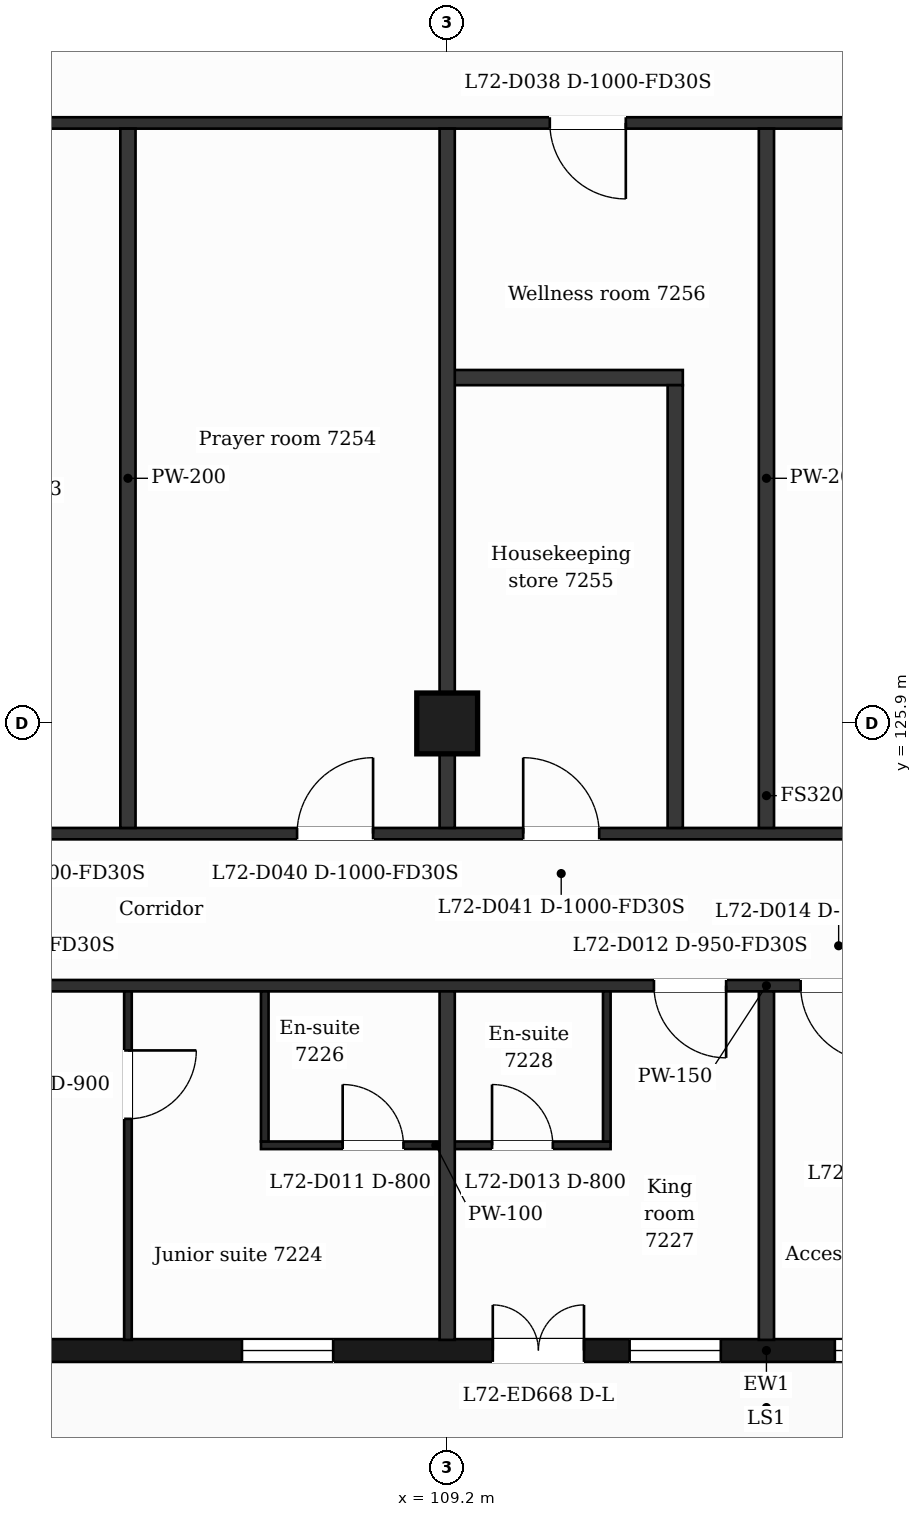
"""IFC4 building model, lengths in metres.
Left out: names, types, materials, properties, quantities, classifications, styles, units other than length and angle.
Written with IfcOpenShell. Run it as: python <this file> out.ifc"""

import sys

from ifc_helpers import new_model, si_unit, direction, frame, frame_2d, origin, origin_2d, place, context, subcontext, project, spatial, rectangle, extrude, element, fill, save


model = new_model("IFC4")
c1 = context("Model", 3, precision=1e-05, world=origin(), true_north=direction((0.0, 1.0)))
c2 = subcontext(c1, "Body", "Model", "MODEL_VIEW")
j1 = project(units=[si_unit("LENGTHUNIT", "METRE"), si_unit("PLANEANGLEUNIT", "RADIAN")], contexts=[c1])
p1 = place(None, origin())
s1 = spatial("IfcSite", under=j1, at=p1, CompositionType="ELEMENT")
p2 = place(p1, origin())
s2 = spatial("IfcBuilding", under=s1, at=p2, CompositionType="ELEMENT")
p3 = place(p2, frame((0.0, 0.0, 296.0)))
s3 = spatial("IfcBuildingStorey", under=s2, at=p3, CompositionType="ELEMENT", Elevation=296.0)
p4 = place(p3, frame((109.2, 125.9, 0.0), z_axis=(0.0, 0.0, 1.0), x_axis=(1.0, 0.0, 0.0)))
e1 = element("IfcColumn", 1, at=p4, inside=s3, PredefinedType="COLUMN", context=c2, shape_type="SweptSolid", body=[
    extrude(rectangle(XDim=0.8, YDim=0.8, at=origin_2d()), origin(), (0.0, 0.0, 1.0), 3.7),
])
p5 = place(p3, frame((100.8, 117.65, 0.0), z_axis=(0.0, 0.0, 1.0), x_axis=(1.0, 0.0, 0.0)))
e2 = element("IfcWall", 2, at=p5, inside=s3, PredefinedType="SOLIDWALL", context=c2, shape_type="SweptSolid", body=[
    extrude(rectangle(XDim=25.2, YDim=0.3, at=frame_2d((12.6, 0.0))), origin(), (0.0, 0.0, 1.0), 3.38),
])
p6 = place(p5, frame((1.55, 0.0, 0.9)))
e3 = element("IfcOpeningElement", 3, at=p6, cuts=e2, PredefinedType="OPENING", context=c2, shape_type="SweptSolid", body=[
    extrude(rectangle(XDim=1.2, YDim=2.1, at=frame_2d((0.6, 1.05))), frame((0.0, 0.16, 0.0), z_axis=(0.0, -1.0, 0.0), x_axis=(1.0, 0.0, 0.0)), (0.0, 0.0, 1.0), 0.32),
])
p7 = place(p5, frame((5.7, 0.0, 0.9)))
e4 = element("IfcOpeningElement", 4, at=p7, cuts=e2, PredefinedType="OPENING", context=c2, shape_type="SweptSolid", body=[
    extrude(rectangle(XDim=1.2, YDim=2.1, at=frame_2d((0.6, 1.05))), frame((0.0, 0.16, 0.0), z_axis=(0.0, -1.0, 0.0), x_axis=(1.0, 0.0, 0.0)), (0.0, 0.0, 1.0), 0.32),
])
p8 = place(p5, frame((9.0, 0.0, 0.0)))
e5 = element("IfcOpeningElement", 5, at=p8, cuts=e2, PredefinedType="OPENING", context=c2, shape_type="SweptSolid", body=[
    extrude(rectangle(XDim=1.2, YDim=2.4, at=frame_2d((0.6, 1.2))), frame((0.0, 0.16, 0.0), z_axis=(0.0, -1.0, 0.0), x_axis=(1.0, 0.0, 0.0)), (0.0, 0.0, 1.0), 0.32),
])
p9 = place(p5, frame((10.8, 0.0, 0.9)))
e6 = element("IfcOpeningElement", 6, at=p9, cuts=e2, PredefinedType="OPENING", context=c2, shape_type="SweptSolid", body=[
    extrude(rectangle(XDim=1.2, YDim=2.1, at=frame_2d((0.6, 1.05))), frame((0.0, 0.16, 0.0), z_axis=(0.0, -1.0, 0.0), x_axis=(1.0, 0.0, 0.0)), (0.0, 0.0, 1.0), 0.32),
])
p10 = place(p5, frame((13.5, 0.0, 0.9)))
e7 = element("IfcOpeningElement", 7, at=p10, cuts=e2, PredefinedType="OPENING", context=c2, shape_type="SweptSolid", body=[
    extrude(rectangle(XDim=2.4, YDim=2.1, at=frame_2d((1.2, 1.05))), frame((0.0, 0.16, 0.0), z_axis=(0.0, -1.0, 0.0), x_axis=(1.0, 0.0, 0.0)), (0.0, 0.0, 1.0), 0.32),
])
p11 = place(p5, frame((17.4, 0.0, 0.0)))
e8 = element("IfcOpeningElement", 8, at=p11, cuts=e2, PredefinedType="OPENING", context=c2, shape_type="SweptSolid", body=[
    extrude(rectangle(XDim=1.2, YDim=2.4, at=frame_2d((0.6, 1.2))), frame((0.0, 0.16, 0.0), z_axis=(0.0, -1.0, 0.0), x_axis=(1.0, 0.0, 0.0)), (0.0, 0.0, 1.0), 0.32),
])
p12 = place(p5, frame((19.2, 0.0, 0.9)))
e9 = element("IfcOpeningElement", 9, at=p12, cuts=e2, PredefinedType="OPENING", context=c2, shape_type="SweptSolid", body=[
    extrude(rectangle(XDim=1.2, YDim=2.1, at=frame_2d((0.6, 1.05))), frame((0.0, 0.16, 0.0), z_axis=(0.0, -1.0, 0.0), x_axis=(1.0, 0.0, 0.0)), (0.0, 0.0, 1.0), 0.32),
])
p13 = place(p5, frame((21.85, 0.0, 0.9)))
e10 = element("IfcOpeningElement", 10, at=p13, cuts=e2, PredefinedType="OPENING", context=c2, shape_type="SweptSolid", body=[
    extrude(rectangle(XDim=2.4, YDim=2.1, at=frame_2d((1.2, 1.05))), frame((0.0, 0.16, 0.0), z_axis=(0.0, -1.0, 0.0), x_axis=(1.0, 0.0, 0.0)), (0.0, 0.0, 1.0), 0.32),
])
p14 = place(p3, frame((106.75, 120.35, 0.0), z_axis=(0.0, 0.0, 1.0), x_axis=(1.0, 0.0, 0.0)))
e11 = element("IfcWall", 11, at=p14, inside=s3, PredefinedType="PARTITIONING", context=c2, shape_type="SweptSolid", body=[
    extrude(rectangle(XDim=4.6, YDim=0.1, at=frame_2d((2.3, 0.0))), origin(), (0.0, 0.0, 1.0), 3.38),
])
p15 = place(p14, frame((1.075, 0.0, 0.0)))
e12 = element("IfcOpeningElement", 12, at=p15, cuts=e11, PredefinedType="OPENING", context=c2, shape_type="SweptSolid", body=[
    extrude(rectangle(XDim=0.8, YDim=2.1, at=frame_2d((0.4, 1.05))), frame((0.0, 0.06, 0.0), z_axis=(0.0, -1.0, 0.0), x_axis=(1.0, 0.0, 0.0)), (0.0, 0.0, 1.0), 0.12),
])
p16 = place(p14, frame((3.04, 0.0, 0.0)))
e13 = element("IfcOpeningElement", 13, at=p16, cuts=e11, PredefinedType="OPENING", context=c2, shape_type="SweptSolid", body=[
    extrude(rectangle(XDim=0.8, YDim=2.1, at=frame_2d((0.4, 1.05))), frame((0.0, 0.06, 0.0), z_axis=(0.0, -1.0, 0.0), x_axis=(1.0, 0.0, 0.0)), (0.0, 0.0, 1.0), 0.12),
])
p17 = place(p3, frame((100.8, 122.45, 0.0), z_axis=(0.0, 0.0, 1.0), x_axis=(1.0, 0.0, 0.0)))
e14 = element("IfcWall", 14, at=p17, inside=s3, PredefinedType="PARTITIONING", context=c2, shape_type="SweptSolid", body=[
    extrude(rectangle(XDim=25.2, YDim=0.15, at=frame_2d((12.6, 0.0))), origin(), (0.0, 0.0, 1.0), 3.38),
])
p18 = place(p17, frame((1.6, 0.0, 0.0)))
e15 = element("IfcOpeningElement", 15, at=p18, cuts=e14, PredefinedType="OPENING", context=c2, shape_type="SweptSolid", body=[
    extrude(rectangle(XDim=1.0, YDim=2.1, at=frame_2d((0.5, 1.05))), frame((0.0, 0.085, 0.0), z_axis=(0.0, -1.0, 0.0), x_axis=(1.0, 0.0, 0.0)), (0.0, 0.0, 1.0), 0.17),
])
p19 = place(p17, frame((11.12, 0.0, 0.0)))
e16 = element("IfcOpeningElement", 16, at=p19, cuts=e14, PredefinedType="OPENING", context=c2, shape_type="SweptSolid", body=[
    extrude(rectangle(XDim=0.95, YDim=2.1, at=frame_2d((0.475, 1.05))), frame((0.0, 0.085, 0.0), z_axis=(0.0, -1.0, 0.0), x_axis=(1.0, 0.0, 0.0)), (0.0, 0.0, 1.0), 0.17),
])
p20 = place(p17, frame((13.05, 0.0, 0.0)))
e17 = element("IfcOpeningElement", 17, at=p20, cuts=e14, PredefinedType="OPENING", context=c2, shape_type="SweptSolid", body=[
    extrude(rectangle(XDim=1.0, YDim=2.1, at=frame_2d((0.5, 1.05))), frame((0.0, 0.085, 0.0), z_axis=(0.0, -1.0, 0.0), x_axis=(1.0, 0.0, 0.0)), (0.0, 0.0, 1.0), 0.17),
])
p21 = place(p17, frame((19.61, 0.0, 0.0)))
e18 = element("IfcOpeningElement", 18, at=p21, cuts=e14, PredefinedType="OPENING", context=c2, shape_type="SweptSolid", body=[
    extrude(rectangle(XDim=0.95, YDim=2.1, at=frame_2d((0.475, 1.05))), frame((0.0, 0.085, 0.0), z_axis=(0.0, -1.0, 0.0), x_axis=(1.0, 0.0, 0.0)), (0.0, 0.0, 1.0), 0.17),
])
p22 = place(p17, frame((21.275, 0.0, 0.0)))
e19 = element("IfcOpeningElement", 19, at=p22, cuts=e14, PredefinedType="OPENING", context=c2, shape_type="SweptSolid", body=[
    extrude(rectangle(XDim=0.95, YDim=2.1, at=frame_2d((0.475, 1.05))), frame((0.0, 0.085, 0.0), z_axis=(0.0, -1.0, 0.0), x_axis=(1.0, 0.0, 0.0)), (0.0, 0.0, 1.0), 0.17),
])
p23 = place(p3, frame((100.8, 124.45, 0.0), z_axis=(0.0, 0.0, 1.0), x_axis=(1.0, 0.0, 0.0)))
e20 = element("IfcWall", 20, at=p23, inside=s3, PredefinedType="PARTITIONING", context=c2, shape_type="SweptSolid", body=[
    extrude(rectangle(XDim=25.2, YDim=0.15, at=frame_2d((12.6, 0.0))), origin(), (0.0, 0.0, 1.0), 3.38),
])
p24 = place(p23, frame((1.85, 0.0, 0.0)))
e21 = element("IfcOpeningElement", 21, at=p24, cuts=e20, PredefinedType="OPENING", context=c2, shape_type="SweptSolid", body=[
    extrude(rectangle(XDim=1.0, YDim=2.1, at=frame_2d((0.5, 1.05))), frame((0.0, 0.085, 0.0), z_axis=(0.0, -1.0, 0.0), x_axis=(1.0, 0.0, 0.0)), (0.0, 0.0, 1.0), 0.17),
])
p25 = place(p23, frame((6.425, 0.0, 0.0)))
e22 = element("IfcOpeningElement", 22, at=p25, cuts=e20, PredefinedType="OPENING", context=c2, shape_type="SweptSolid", body=[
    extrude(rectangle(XDim=1.0, YDim=2.1, at=frame_2d((0.5, 1.05))), frame((0.0, 0.085, 0.0), z_axis=(0.0, -1.0, 0.0), x_axis=(1.0, 0.0, 0.0)), (0.0, 0.0, 1.0), 0.17),
])
p26 = place(p23, frame((9.4, 0.0, 0.0)))
e23 = element("IfcOpeningElement", 23, at=p26, cuts=e20, PredefinedType="OPENING", context=c2, shape_type="SweptSolid", body=[
    extrude(rectangle(XDim=1.0, YDim=2.1, at=frame_2d((0.5, 1.05))), frame((0.0, 0.085, 0.0), z_axis=(0.0, -1.0, 0.0), x_axis=(1.0, 0.0, 0.0)), (0.0, 0.0, 1.0), 0.17),
])
p27 = place(p23, frame((14.825, 0.0, 0.0)))
e24 = element("IfcOpeningElement", 24, at=p27, cuts=e20, PredefinedType="OPENING", context=c2, shape_type="SweptSolid", body=[
    extrude(rectangle(XDim=1.0, YDim=2.1, at=frame_2d((0.5, 1.05))), frame((0.0, 0.085, 0.0), z_axis=(0.0, -1.0, 0.0), x_axis=(1.0, 0.0, 0.0)), (0.0, 0.0, 1.0), 0.17),
])
p28 = place(p23, frame((18.825, 0.0, 0.0)))
e25 = element("IfcOpeningElement", 25, at=p28, cuts=e20, PredefinedType="OPENING", context=c2, shape_type="SweptSolid", body=[
    extrude(rectangle(XDim=1.0, YDim=2.1, at=frame_2d((0.5, 1.05))), frame((0.0, 0.085, 0.0), z_axis=(0.0, -1.0, 0.0), x_axis=(1.0, 0.0, 0.0)), (0.0, 0.0, 1.0), 0.17),
])
p29 = place(p3, frame((109.2, 130.45, 0.0), z_axis=(0.0, 0.0, 1.0), x_axis=(1.0, 0.0, 0.0)))
e26 = element("IfcWall", 26, at=p29, inside=s3, PredefinedType="PARTITIONING", context=c2, shape_type="SweptSolid", body=[
    extrude(rectangle(XDim=3.1, YDim=0.2, at=frame_2d((1.55, 0.0))), origin(), (0.0, 0.0, 1.0), 3.38),
])
p30 = place(p3, frame((100.725, 133.8, 0.0), z_axis=(0.0, 0.0, 1.0), x_axis=(1.0, 0.0, 0.0)))
e27 = element("IfcWall", 27, at=p30, inside=s3, PredefinedType="PARTITIONING", context=c2, shape_type="SweptSolid", body=[
    extrude(rectangle(XDim=25.35, YDim=0.15, at=frame_2d((12.675, 0.0))), origin(), (0.0, 0.0, 1.0), 3.38),
])
p31 = place(p30, frame((9.825, 0.0, 0.0)))
e28 = element("IfcOpeningElement", 28, at=p31, cuts=e27, PredefinedType="OPENING", context=c2, shape_type="SweptSolid", body=[
    extrude(rectangle(XDim=1.0, YDim=2.1, at=frame_2d((0.5, 1.05))), frame((0.0, 0.085, 0.0), z_axis=(0.0, -1.0, 0.0), x_axis=(1.0, 0.0, 0.0)), (0.0, 0.0, 1.0), 0.17),
])
p32 = place(p3, frame((105.0, 117.79, 0.0), z_axis=(0.0, 0.0, 1.0), x_axis=(0.0, 1.0, 0.0)))
e29 = element("IfcWall", 29, at=p32, inside=s3, PredefinedType="PARTITIONING", context=c2, shape_type="SweptSolid", body=[
    extrude(rectangle(XDim=4.585, YDim=0.1, at=frame_2d((2.292, 0.0))), origin(), (0.0, 0.0, 1.0), 3.38),
])
p33 = place(p32, frame((2.908, 0.0, 0.0)))
e30 = element("IfcOpeningElement", 30, at=p33, cuts=e29, PredefinedType="OPENING", context=c2, shape_type="SweptSolid", body=[
    extrude(rectangle(XDim=0.9, YDim=2.1, at=frame_2d((0.45, 1.05))), frame((0.0, 0.06, 0.0), z_axis=(0.0, -1.0, 0.0), x_axis=(1.0, 0.0, 0.0)), (0.0, 0.0, 1.0), 0.12),
])
p34 = place(p3, frame((105.0, 124.525, 0.0), z_axis=(0.0, 0.0, 1.0), x_axis=(0.0, 1.0, 0.0)))
e31 = element("IfcWall", 31, at=p34, inside=s3, PredefinedType="PARTITIONING", context=c2, shape_type="SweptSolid", body=[
    extrude(rectangle(XDim=9.2, YDim=0.2, at=frame_2d((4.6, 0.0))), origin(), (0.0, 0.0, 1.0), 3.38),
])
p35 = place(p3, frame((106.8, 120.4, 0.0), z_axis=(0.0, 0.0, 1.0), x_axis=(0.0, 1.0, 0.0)))
e32 = element("IfcWall", 32, at=p35, inside=s3, PredefinedType="PARTITIONING", context=c2, shape_type="SweptSolid", body=[
    extrude(rectangle(XDim=1.975, YDim=0.1, at=frame_2d((0.988, 0.0))), origin(), (0.0, 0.0, 1.0), 3.38),
])
p36 = place(p3, frame((109.2, 117.79, 0.0), z_axis=(0.0, 0.0, 1.0), x_axis=(0.0, 1.0, 0.0)))
e33 = element("IfcWall", 33, at=p36, inside=s3, PredefinedType="PARTITIONING", context=c2, shape_type="SweptSolid", body=[
    extrude(rectangle(XDim=4.585, YDim=0.2, at=frame_2d((2.292, 0.0))), origin(), (0.0, 0.0, 1.0), 3.38),
])
p37 = place(p3, frame((109.2, 124.525, 0.0), z_axis=(0.0, 0.0, 1.0), x_axis=(0.0, 1.0, 0.0)))
e34 = element("IfcWall", 34, at=p37, inside=s3, PredefinedType="PARTITIONING", context=c2, shape_type="SweptSolid", body=[
    extrude(rectangle(XDim=9.2, YDim=0.2, at=frame_2d((4.6, 0.0))), origin(), (0.0, 0.0, 1.0), 3.38),
])
p38 = place(p3, frame((111.3, 120.4, 0.0), z_axis=(0.0, 0.0, 1.0), x_axis=(0.0, 1.0, 0.0)))
e35 = element("IfcWall", 35, at=p38, inside=s3, PredefinedType="PARTITIONING", context=c2, shape_type="SweptSolid", body=[
    extrude(rectangle(XDim=1.975, YDim=0.1, at=frame_2d((0.988, 0.0))), origin(), (0.0, 0.0, 1.0), 3.38),
])
p39 = place(p3, frame((112.2, 124.525, 0.0), z_axis=(0.0, 0.0, 1.0), x_axis=(0.0, 1.0, 0.0)))
e36 = element("IfcWall", 36, at=p39, inside=s3, PredefinedType="PARTITIONING", context=c2, shape_type="SweptSolid", body=[
    extrude(rectangle(XDim=5.825, YDim=0.2, at=frame_2d((2.913, 0.0))), origin(), (0.0, 0.0, 1.0), 3.38),
])
p40 = place(p3, frame((113.4, 117.79, 0.0), z_axis=(0.0, 0.0, 1.0), x_axis=(0.0, 1.0, 0.0)))
e37 = element("IfcWall", 37, at=p40, inside=s3, PredefinedType="PARTITIONING", context=c2, shape_type="SweptSolid", body=[
    extrude(rectangle(XDim=4.585, YDim=0.2, at=frame_2d((2.292, 0.0))), origin(), (0.0, 0.0, 1.0), 3.38),
])
p41 = place(p3, frame((113.4, 124.525, 0.0), z_axis=(0.0, 0.0, 1.0), x_axis=(0.0, 1.0, 0.0)))
e38 = element("IfcWall", 38, at=p41, inside=s3, PredefinedType="PARTITIONING", context=c2, shape_type="SweptSolid", body=[
    extrude(rectangle(XDim=9.2, YDim=0.2, at=frame_2d((4.6, 0.0))), origin(), (0.0, 0.0, 1.0), 3.38),
])
p42 = place(p7, origin())
e39 = element("IfcWindow", 39, at=p42, inside=s3, PartitioningType="SINGLE_PANEL", PredefinedType="WINDOW", context=c2, shape_type="SweptSolid", body=[
    extrude(rectangle(XDim=1.2, YDim=2.1, at=frame_2d((0.6, 1.05))), frame((0.0, 0.03, 0.0), z_axis=(0.0, -1.0, 0.0), x_axis=(1.0, 0.0, 0.0)), (0.0, 0.0, 1.0), 0.06),
])
fill(e4, e39)
p43 = place(p8, origin())
e40 = element("IfcDoor", 40, at=p43, inside=s3, OperationType="DOUBLE_DOOR_SINGLE_SWING", PredefinedType="DOOR", context=c2, shape_type="SweptSolid", body=[
    extrude(rectangle(XDim=1.2, YDim=2.4, at=frame_2d((0.6, 1.2))), frame((0.0, 0.025, 0.0), z_axis=(0.0, -1.0, 0.0), x_axis=(1.0, 0.0, 0.0)), (0.0, 0.0, 1.0), 0.05),
])
fill(e5, e40)
p44 = place(p9, origin())
e41 = element("IfcWindow", 41, at=p44, inside=s3, PartitioningType="SINGLE_PANEL", PredefinedType="WINDOW", context=c2, shape_type="SweptSolid", body=[
    extrude(rectangle(XDim=1.2, YDim=2.1, at=frame_2d((0.6, 1.05))), frame((0.0, 0.03, 0.0), z_axis=(0.0, -1.0, 0.0), x_axis=(1.0, 0.0, 0.0)), (0.0, 0.0, 1.0), 0.06),
])
fill(e6, e41)
p45 = place(p10, origin())
e42 = element("IfcWindow", 42, at=p45, inside=s3, PartitioningType="SINGLE_PANEL", PredefinedType="WINDOW", context=c2, shape_type="SweptSolid", body=[
    extrude(rectangle(XDim=2.4, YDim=2.1, at=frame_2d((1.2, 1.05))), frame((0.0, 0.03, 0.0), z_axis=(0.0, -1.0, 0.0), x_axis=(1.0, 0.0, 0.0)), (0.0, 0.0, 1.0), 0.06),
])
fill(e7, e42)
p46 = place(p33, origin())
e43 = element("IfcDoor", 43, at=p46, inside=s3, OperationType="SINGLE_SWING_RIGHT", PredefinedType="DOOR", context=c2, shape_type="SweptSolid", body=[
    extrude(rectangle(XDim=0.9, YDim=2.1, at=frame_2d((0.45, 1.05))), frame((0.0, 0.025, 0.0), z_axis=(0.0, -1.0, 0.0), x_axis=(1.0, 0.0, 0.0)), (0.0, 0.0, 1.0), 0.05),
])
fill(e30, e43)
p47 = place(p15, origin())
e44 = element("IfcDoor", 44, at=p47, inside=s3, OperationType="SINGLE_SWING_LEFT", PredefinedType="DOOR", context=c2, shape_type="SweptSolid", body=[
    extrude(rectangle(XDim=0.8, YDim=2.1, at=frame_2d((0.4, 1.05))), frame((0.0, 0.025, 0.0), z_axis=(0.0, -1.0, 0.0), x_axis=(1.0, 0.0, 0.0)), (0.0, 0.0, 1.0), 0.05),
])
fill(e12, e44)
p48 = place(p19, origin())
e45 = element("IfcDoor", 45, at=p48, inside=s3, OperationType="SINGLE_SWING_RIGHT", PredefinedType="DOOR", context=c2, shape_type="SweptSolid", body=[
    extrude(rectangle(XDim=0.95, YDim=2.1, at=frame_2d((0.475, 1.05))), frame((0.0, 0.025, 0.0), z_axis=(0.0, -1.0, 0.0), x_axis=(1.0, 0.0, 0.0)), (0.0, 0.0, 1.0), 0.05),
])
fill(e16, e45)
p49 = place(p16, origin())
e46 = element("IfcDoor", 46, at=p49, inside=s3, OperationType="SINGLE_SWING_LEFT", PredefinedType="DOOR", context=c2, shape_type="SweptSolid", body=[
    extrude(rectangle(XDim=0.8, YDim=2.1, at=frame_2d((0.4, 1.05))), frame((0.0, 0.025, 0.0), z_axis=(0.0, -1.0, 0.0), x_axis=(1.0, 0.0, 0.0)), (0.0, 0.0, 1.0), 0.05),
])
fill(e13, e46)
p50 = place(p20, origin())
e47 = element("IfcDoor", 47, at=p50, inside=s3, OperationType="SINGLE_SWING_RIGHT", PredefinedType="DOOR", context=c2, shape_type="SweptSolid", body=[
    extrude(rectangle(XDim=1.0, YDim=2.1, at=frame_2d((0.5, 1.05))), frame((0.0, 0.025, 0.0), z_axis=(0.0, -1.0, 0.0), x_axis=(1.0, 0.0, 0.0)), (0.0, 0.0, 1.0), 0.05),
])
fill(e17, e47)
p51 = place(p31, origin())
e48 = element("IfcDoor", 48, at=p51, inside=s3, OperationType="SINGLE_SWING_RIGHT", PredefinedType="DOOR", context=c2, shape_type="SweptSolid", body=[
    extrude(rectangle(XDim=1.0, YDim=2.1, at=frame_2d((0.5, 1.05))), frame((0.0, 0.025, 0.0), z_axis=(0.0, -1.0, 0.0), x_axis=(1.0, 0.0, 0.0)), (0.0, 0.0, 1.0), 0.05),
])
fill(e28, e48)
p52 = place(p25, origin())
e49 = element("IfcDoor", 49, at=p52, inside=s3, OperationType="SINGLE_SWING_RIGHT", PredefinedType="DOOR", context=c2, shape_type="SweptSolid", body=[
    extrude(rectangle(XDim=1.0, YDim=2.1, at=frame_2d((0.5, 1.05))), frame((0.0, 0.025, 0.0), z_axis=(0.0, -1.0, 0.0), x_axis=(1.0, 0.0, 0.0)), (0.0, 0.0, 1.0), 0.05),
])
fill(e22, e49)
p53 = place(p26, origin())
e50 = element("IfcDoor", 50, at=p53, inside=s3, OperationType="SINGLE_SWING_LEFT", PredefinedType="DOOR", context=c2, shape_type="SweptSolid", body=[
    extrude(rectangle(XDim=1.0, YDim=2.1, at=frame_2d((0.5, 1.05))), frame((0.0, 0.025, 0.0), z_axis=(0.0, -1.0, 0.0), x_axis=(1.0, 0.0, 0.0)), (0.0, 0.0, 1.0), 0.05),
])
fill(e23, e50)
save(model, sys.argv[1])
